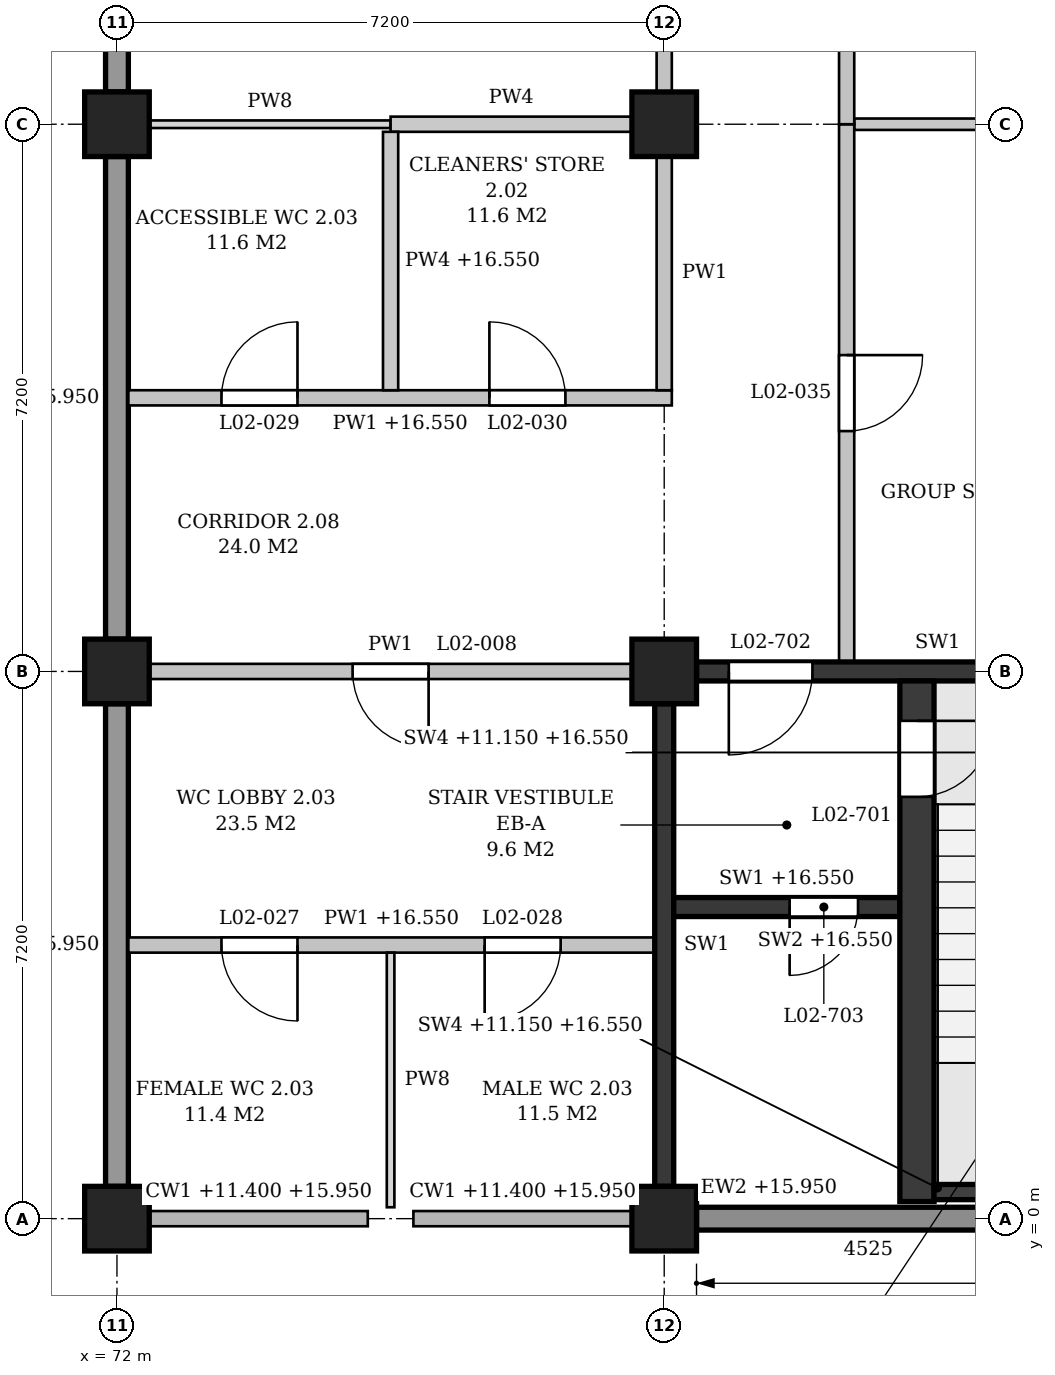
"""IFC4 building model, lengths in metres.
Left out: names, types, materials, properties, quantities, classifications, styles, units other than length and angle.
Written with IfcOpenShell. Run it as: python <this file> out.ifc"""

import sys

from ifc_helpers import new_model, si_unit, direction, frame, frame_2d, origin, origin_2d, place, context, subcontext, project, spatial, polyline, rectangle, outline, extrude, element, fill, save


model = new_model("IFC4")
c1 = context("Model", 3, precision=1e-05, world=origin(), true_north=direction((0.0, 1.0)))
c2 = subcontext(c1, "Body", "Model", "MODEL_VIEW")
j1 = project(units=[si_unit("LENGTHUNIT", "METRE"), si_unit("PLANEANGLEUNIT", "RADIAN")], contexts=[c1])
p1 = place(None, origin())
s1 = spatial("IfcSite", under=j1, at=p1, CompositionType="ELEMENT")
p2 = place(p1, origin())
s2 = spatial("IfcBuilding", under=s1, at=p2, CompositionType="ELEMENT")
p3 = place(p2, frame((0.0, 0.0, 11.4)))
s3 = spatial("IfcBuildingStorey", under=s2, at=p3, CompositionType="ELEMENT", Elevation=11.4)
for number, where, z_axis, x_axis in (
    (1, (72.0, 0.0, 0.0), (0.0, 0.0, 1.0), (1.0, 0.0, 0.0)),
    (2, (72.0, 7.2, 0.0), (0.0, 0.0, 1.0), (1.0, 0.0, 0.0)),
    (3, (72.0, 14.4, 0.0), (0.0, 0.0, 1.0), (1.0, 0.0, 0.0)),
    (4, (79.2, 0.0, 0.0), (0.0, 0.0, 1.0), (1.0, 0.0, 0.0)),
    (5, (79.2, 7.2, 0.0), (0.0, 0.0, 1.0), (1.0, 0.0, 0.0)),
    (6, (79.2, 14.4, 0.0), (0.0, 0.0, 1.0), (1.0, 0.0, 0.0)),
):
    element("IfcColumn", number, at=place(p3, frame(where, z_axis=z_axis, x_axis=x_axis)), inside=s3, PredefinedType="COLUMN", context=c2, shape_type="SweptSolid", body=[
        extrude(rectangle(XDim=0.85, YDim=0.85, at=origin_2d()), origin(), (0.0, 0.0, 1.0), 5.4),
    ])
p4 = place(p3, frame((79.625, 0.0, 0.0), z_axis=(0.0, 0.0, 1.0), x_axis=(1.0, 0.0, 0.0)))
e7 = element("IfcWall", 7, at=p4, inside=s3, PredefinedType="STANDARD", context=c2, shape_type="SweptSolid", body=[
    extrude(rectangle(XDim=6.35, YDim=0.3, at=frame_2d((3.175, 0.0))), origin(), (0.0, 0.0, 1.0), 4.55),
])
p5 = place(p4, frame((4.525, 0.0, 0.9)))
e8 = element("IfcOpeningElement", 8, at=p5, cuts=e7, PredefinedType="OPENING", context=c2, shape_type="SweptSolid", body=[
    extrude(outline(polyline([(0.0, 0.0), (0.9, 0.0), (0.9, 2.65), (0.45, 3.1), (0.0, 2.65), (0.0, 0.0)])), frame((0.0, 0.16, 0.0), z_axis=(0.0, -1.0, 0.0), x_axis=(1.0, 0.0, 0.0)), (0.0, 0.0, 1.0), 0.32),
])
p6 = place(p3, frame((72.0, 0.425, 0.0), z_axis=(0.0, 0.0, 1.0), x_axis=(0.0, 1.0, 0.0)))
e9 = element("IfcWall", 9, at=p6, inside=s3, PredefinedType="STANDARD", context=c2, shape_type="SweptSolid", body=[
    extrude(rectangle(XDim=6.35, YDim=0.3, at=frame_2d((3.175, 0.0))), origin(), (0.0, 0.0, 1.0), 4.55),
])
for number, where, z_axis, x_axis in (
    (10, (72.0, 7.625, 0.0), (0.0, 0.0, 1.0), (0.0, 1.0, 0.0)),
    (11, (72.0, 14.825, 0.0), (0.0, 0.0, 1.0), (0.0, 1.0, 0.0)),
):
    element("IfcWall", number, at=place(p3, frame(where, z_axis=z_axis, x_axis=x_axis)), inside=s3, PredefinedType="STANDARD", context=c2, shape_type="SweptSolid", body=[
        extrude(rectangle(XDim=6.35, YDim=0.3, at=frame_2d((3.175, 0.0))), origin(), (0.0, 0.0, 1.0), 4.55),
    ])
p7 = place(p3, frame((79.625, 7.2, 0.0), z_axis=(0.0, 0.0, 1.0), x_axis=(1.0, 0.0, 0.0)))
e12 = element("IfcWall", 12, at=p7, inside=s3, PredefinedType="SHEAR", context=c2, shape_type="SweptSolid", body=[
    extrude(rectangle(XDim=6.35, YDim=0.25, at=frame_2d((3.175, 0.0))), origin(), (0.0, 0.0, 1.0), 4.4),
])
p8 = place(p7, frame((0.425, 0.0, 0.0)))
e13 = element("IfcOpeningElement", 13, at=p8, cuts=e12, PredefinedType="OPENING", context=c2, shape_type="SweptSolid", body=[
    extrude(rectangle(XDim=1.1, YDim=2.1, at=frame_2d((0.55, 1.05))), frame((0.0, 0.135, 0.0), z_axis=(0.0, -1.0, 0.0), x_axis=(1.0, 0.0, 0.0)), (0.0, 0.0, 1.0), 0.27),
])
p9 = place(p3, frame((79.2, 0.425, 0.0), z_axis=(0.0, 0.0, 1.0), x_axis=(0.0, 1.0, 0.0)))
e14 = element("IfcWall", 14, at=p9, inside=s3, PredefinedType="SHEAR", context=c2, shape_type="SweptSolid", body=[
    extrude(rectangle(XDim=6.35, YDim=0.25, at=frame_2d((3.175, 0.0))), origin(), (0.0, 0.0, 1.0), 4.4),
])
p10 = place(p3, frame((82.75, 0.35, -0.25), z_axis=(0.0, 0.0, 1.0), x_axis=(1.0, 0.0, 0.0)))
e15 = element("IfcWall", 15, at=p10, inside=s3, PredefinedType="SHEAR", context=c2, shape_type="SweptSolid", body=[
    extrude(rectangle(XDim=1.4, YDim=0.2, at=frame_2d((0.7, 0.0))), origin(), (0.0, 0.0, 1.0), 5.4),
])
p11 = place(p3, frame((82.525, 0.225, 0.0), z_axis=(0.0, 0.0, 1.0), x_axis=(0.0, 1.0, 0.0)))
e16 = element("IfcWall", 16, at=p11, inside=s3, PredefinedType="SHEAR", context=c2, shape_type="SweptSolid", body=[
    extrude(rectangle(XDim=6.85, YDim=0.45, at=frame_2d((3.425, 0.0))), origin(), (0.0, 0.0, 1.0), 5.15),
])
p12 = place(p11, frame((5.325, 0.0, 0.0)))
e17 = element("IfcOpeningElement", 17, at=p12, cuts=e16, PredefinedType="OPENING", context=c2, shape_type="SweptSolid", body=[
    extrude(rectangle(XDim=1.0, YDim=2.1, at=frame_2d((0.5, 1.05))), frame((0.0, 0.235, 0.0), z_axis=(0.0, -1.0, 0.0), x_axis=(1.0, 0.0, 0.0)), (0.0, 0.0, 1.0), 0.47),
])
p13 = place(p3, frame((79.325, 4.1, 0.0), z_axis=(0.0, 0.0, 1.0), x_axis=(1.0, 0.0, 0.0)))
e18 = element("IfcWall", 18, at=p13, inside=s3, PredefinedType="SHEAR", context=c2, shape_type="SweptSolid", body=[
    extrude(rectangle(XDim=2.975, YDim=0.25, at=frame_2d((1.488, 0.0))), origin(), (0.0, 0.0, 1.0), 5.15),
])
p14 = place(p13, frame((1.525, 0.0, 0.0)))
e19 = element("IfcOpeningElement", 19, at=p14, cuts=e18, PredefinedType="OPENING", context=c2, shape_type="SweptSolid", body=[
    extrude(rectangle(XDim=0.9, YDim=2.1, at=frame_2d((0.45, 1.05))), frame((0.0, 0.135, 0.0), z_axis=(0.0, -1.0, 0.0), x_axis=(1.0, 0.0, 0.0)), (0.0, 0.0, 1.0), 0.27),
])
p15 = place(p3, frame((72.15, 3.6, 0.0), z_axis=(0.0, 0.0, 1.0), x_axis=(1.0, 0.0, 0.0)))
e20 = element("IfcWall", 20, at=p15, inside=s3, PredefinedType="PARTITIONING", context=c2, shape_type="SweptSolid", body=[
    extrude(outline(polyline([(0.0, 0.0), (6.925, 0.0), (6.925, 4.4), (6.8, 4.4), (6.8, 5.15), (0.1, 5.15), (0.1, 4.55), (0.0, 4.55), (0.0, 0.0)])), frame((0.0, 0.1, 0.0), z_axis=(0.0, -1.0, 0.0), x_axis=(1.0, 0.0, 0.0)), (0.0, 0.0, 1.0), 0.2),
])
p16 = place(p15, frame((1.225, 0.0, 0.0)))
e21 = element("IfcOpeningElement", 21, at=p16, cuts=e20, PredefinedType="OPENING", context=c2, shape_type="SweptSolid", body=[
    extrude(rectangle(XDim=1.0, YDim=2.1, at=frame_2d((0.5, 1.05))), frame((0.0, 0.11, 0.0), z_axis=(0.0, -1.0, 0.0), x_axis=(1.0, 0.0, 0.0)), (0.0, 0.0, 1.0), 0.22),
])
p17 = place(p15, frame((4.688, 0.0, 0.0)))
e22 = element("IfcOpeningElement", 22, at=p17, cuts=e20, PredefinedType="OPENING", context=c2, shape_type="SweptSolid", body=[
    extrude(rectangle(XDim=1.0, YDim=2.1, at=frame_2d((0.5, 1.05))), frame((0.0, 0.11, 0.0), z_axis=(0.0, -1.0, 0.0), x_axis=(1.0, 0.0, 0.0)), (0.0, 0.0, 1.0), 0.22),
])
p18 = place(p3, frame((72.425, 7.2, 0.0), z_axis=(0.0, 0.0, 1.0), x_axis=(1.0, 0.0, 0.0)))
e23 = element("IfcWall", 23, at=p18, inside=s3, PredefinedType="PARTITIONING", context=c2, shape_type="SweptSolid", body=[
    extrude(rectangle(XDim=6.35, YDim=0.2, at=frame_2d((3.175, 0.0))), origin(), (0.0, 0.0, 1.0), 4.4),
])
p19 = place(p18, frame((2.675, 0.0, 0.0)))
e24 = element("IfcOpeningElement", 24, at=p19, cuts=e23, PredefinedType="OPENING", context=c2, shape_type="SweptSolid", body=[
    extrude(rectangle(XDim=1.0, YDim=2.1, at=frame_2d((0.5, 1.05))), frame((0.0, 0.11, 0.0), z_axis=(0.0, -1.0, 0.0), x_axis=(1.0, 0.0, 0.0)), (0.0, 0.0, 1.0), 0.22),
])
p20 = place(p3, frame((72.15, 10.8, 0.0), z_axis=(0.0, 0.0, 1.0), x_axis=(1.0, 0.0, 0.0)))
e25 = element("IfcWall", 25, at=p20, inside=s3, PredefinedType="PARTITIONING", context=c2, shape_type="SweptSolid", body=[
    extrude(outline(polyline([(0.0, 0.0), (7.15, 0.0), (7.15, 4.4), (6.8, 4.4), (6.8, 5.15), (0.1, 5.15), (0.1, 4.55), (0.0, 4.55), (0.0, 0.0)])), frame((0.0, 0.1, 0.0), z_axis=(0.0, -1.0, 0.0), x_axis=(1.0, 0.0, 0.0)), (0.0, 0.0, 1.0), 0.2),
])
p21 = place(p20, frame((1.225, 0.0, 0.0)))
e26 = element("IfcOpeningElement", 26, at=p21, cuts=e25, PredefinedType="OPENING", context=c2, shape_type="SweptSolid", body=[
    extrude(rectangle(XDim=1.0, YDim=2.1, at=frame_2d((0.5, 1.05))), frame((0.0, 0.11, 0.0), z_axis=(0.0, -1.0, 0.0), x_axis=(1.0, 0.0, 0.0)), (0.0, 0.0, 1.0), 0.22),
])
p22 = place(p20, frame((4.75, 0.0, 0.0)))
e27 = element("IfcOpeningElement", 27, at=p22, cuts=e25, PredefinedType="OPENING", context=c2, shape_type="SweptSolid", body=[
    extrude(rectangle(XDim=1.0, YDim=2.1, at=frame_2d((0.5, 1.05))), frame((0.0, 0.11, 0.0), z_axis=(0.0, -1.0, 0.0), x_axis=(1.0, 0.0, 0.0)), (0.0, 0.0, 1.0), 0.22),
])
p23 = place(p3, frame((72.425, 14.4, 0.0), z_axis=(0.0, 0.0, 1.0), x_axis=(1.0, 0.0, 0.0)))
e28 = element("IfcWall", 28, at=p23, inside=s3, PredefinedType="PARTITIONING", context=c2, shape_type="SweptSolid", body=[
    extrude(rectangle(XDim=3.175, YDim=0.1, at=frame_2d((1.587, 0.0))), origin(), (0.0, 0.0, 1.0), 4.4),
])
p24 = place(p3, frame((75.6, 14.4, 0.0), z_axis=(0.0, 0.0, 1.0), x_axis=(1.0, 0.0, 0.0)))
e29 = element("IfcWall", 29, at=p24, inside=s3, PredefinedType="PARTITIONING", context=c2, shape_type="SweptSolid", body=[
    extrude(rectangle(XDim=3.175, YDim=0.2, at=frame_2d((1.587, 0.0))), origin(), (0.0, 0.0, 1.0), 4.4),
])
p25 = place(p3, frame((81.7, 14.4, 0.0), z_axis=(0.0, 0.0, 1.0), x_axis=(1.0, 0.0, 0.0)))
e30 = element("IfcWall", 30, at=p25, inside=s3, PredefinedType="PARTITIONING", context=c2, shape_type="SweptSolid", body=[
    extrude(rectangle(XDim=4.275, YDim=0.15, at=frame_2d((2.138, 0.0))), origin(), (0.0, 0.0, 1.0), 4.4),
])
p26 = place(p3, frame((75.6, 0.15, 0.0), z_axis=(0.0, 0.0, 1.0), x_axis=(0.0, 1.0, 0.0)))
e31 = element("IfcWall", 31, at=p26, inside=s3, PredefinedType="PARTITIONING", context=c2, shape_type="SweptSolid", body=[
    extrude(rectangle(XDim=3.35, YDim=0.1, at=frame_2d((1.675, 0.0))), origin(), (0.0, 0.0, 1.0), 4.4),
])
p27 = place(p3, frame((75.6, 10.9, 0.0), z_axis=(0.0, 0.0, 1.0), x_axis=(0.0, 1.0, 0.0)))
e32 = element("IfcWall", 32, at=p27, inside=s3, PredefinedType="PARTITIONING", context=c2, shape_type="SweptSolid", body=[
    extrude(outline(polyline([(0.0, 0.0), (3.4, 0.0), (3.4, 4.4), (3.25, 4.4), (3.25, 5.15), (0.0, 5.15), (0.0, 0.0)])), frame((0.0, 0.1, 0.0), z_axis=(0.0, -1.0, 0.0), x_axis=(1.0, 0.0, 0.0)), (0.0, 0.0, 1.0), 0.2),
])
p28 = place(p3, frame((79.2, 10.9, 0.0), z_axis=(0.0, 0.0, 1.0), x_axis=(0.0, 1.0, 0.0)))
e33 = element("IfcWall", 33, at=p28, inside=s3, PredefinedType="PARTITIONING", context=c2, shape_type="SweptSolid", body=[
    extrude(rectangle(XDim=3.075, YDim=0.2, at=frame_2d((1.538, 0.0))), origin(), (0.0, 0.0, 1.0), 4.4),
])
p29 = place(p3, frame((79.2, 14.825, 0.0), z_axis=(0.0, 0.0, 1.0), x_axis=(0.0, 1.0, 0.0)))
e34 = element("IfcWall", 34, at=p29, inside=s3, PredefinedType="PARTITIONING", context=c2, shape_type="SweptSolid", body=[
    extrude(rectangle(XDim=6.35, YDim=0.2, at=frame_2d((3.175, 0.0))), origin(), (0.0, 0.0, 1.0), 4.4),
])
p30 = place(p29, frame((2.675, 0.0, 0.0)))
e35 = element("IfcOpeningElement", 35, at=p30, cuts=e34, PredefinedType="OPENING", context=c2, shape_type="SweptSolid", body=[
    extrude(rectangle(XDim=1.0, YDim=2.1, at=frame_2d((0.5, 1.05))), frame((0.0, 0.11, 0.0), z_axis=(0.0, -1.0, 0.0), x_axis=(1.0, 0.0, 0.0)), (0.0, 0.0, 1.0), 0.22),
])
p31 = place(p3, frame((81.6, 7.325, 0.0), z_axis=(0.0, 0.0, 1.0), x_axis=(0.0, 1.0, 0.0)))
e36 = element("IfcWall", 36, at=p31, inside=s3, PredefinedType="PARTITIONING", context=c2, shape_type="SweptSolid", body=[
    extrude(outline(polyline([(0.0, 0.0), (7.075, 0.0), (7.075, 4.4), (6.825, 4.4), (6.825, 5.15), (0.125, 5.15), (0.125, 4.4), (0.0, 4.4), (0.0, 0.0)])), frame((0.0, 0.1, 0.0), z_axis=(0.0, -1.0, 0.0), x_axis=(1.0, 0.0, 0.0)), (0.0, 0.0, 1.0), 0.2),
])
p32 = place(p31, frame((3.037, 0.0, 0.0)))
e37 = element("IfcOpeningElement", 37, at=p32, cuts=e36, PredefinedType="OPENING", context=c2, shape_type="SweptSolid", body=[
    extrude(rectangle(XDim=1.0, YDim=2.1, at=frame_2d((0.5, 1.05))), frame((0.0, 0.11, 0.0), z_axis=(0.0, -1.0, 0.0), x_axis=(1.0, 0.0, 0.0)), (0.0, 0.0, 1.0), 0.22),
])
p33 = place(p3, frame((81.6, 14.4, 0.0), z_axis=(0.0, 0.0, 1.0), x_axis=(0.0, 1.0, 0.0)))
e38 = element("IfcWall", 38, at=p33, inside=s3, PredefinedType="PARTITIONING", context=c2, shape_type="SweptSolid", body=[
    extrude(outline(polyline([(0.0, 0.0), (7.2, 0.0), (7.2, 4.4), (6.95, 4.4), (6.95, 5.15), (0.25, 5.15), (0.25, 4.4), (0.0, 4.4), (0.0, 0.0)])), frame((0.0, 0.1, 0.0), z_axis=(0.0, -1.0, 0.0), x_axis=(1.0, 0.0, 0.0)), (0.0, 0.0, 1.0), 0.2),
])
p34 = place(p33, frame((1.3, 0.0, 0.0)))
e39 = element("IfcOpeningElement", 39, at=p34, cuts=e38, PredefinedType="OPENING", context=c2, shape_type="SweptSolid", body=[
    extrude(rectangle(XDim=1.0, YDim=2.1, at=frame_2d((0.5, 1.05))), frame((0.0, 0.11, 0.0), z_axis=(0.0, -1.0, 0.0), x_axis=(1.0, 0.0, 0.0)), (0.0, 0.0, 1.0), 0.22),
])
p35 = place(p33, frame((4.9, 0.0, 0.0)))
e40 = element("IfcOpeningElement", 40, at=p35, cuts=e38, PredefinedType="OPENING", context=c2, shape_type="SweptSolid", body=[
    extrude(rectangle(XDim=1.0, YDim=2.1, at=frame_2d((0.5, 1.05))), frame((0.0, 0.11, 0.0), z_axis=(0.0, -1.0, 0.0), x_axis=(1.0, 0.0, 0.0)), (0.0, 0.0, 1.0), 0.22),
])
p36 = place(p12, frame((1.0, 0.0, 0.0), z_axis=(0.0, 0.0, 1.0), x_axis=(-1.0, 0.0, 0.0)))
e41 = element("IfcDoor", 41, at=p36, inside=s3, OperationType="SINGLE_SWING_LEFT", PredefinedType="DOOR", context=c2, shape_type="SweptSolid", body=[
    extrude(rectangle(XDim=1.0, YDim=2.1, at=frame_2d((0.5, 1.05))), frame((0.0, 0.025, 0.0), z_axis=(0.0, -1.0, 0.0), x_axis=(1.0, 0.0, 0.0)), (0.0, 0.0, 1.0), 0.05),
])
fill(e17, e41)
p37 = place(p8, frame((1.1, 0.0, 0.0), z_axis=(0.0, 0.0, 1.0), x_axis=(-1.0, 0.0, 0.0)))
e42 = element("IfcDoor", 42, at=p37, inside=s3, OperationType="SINGLE_SWING_RIGHT", PredefinedType="DOOR", context=c2, shape_type="SweptSolid", body=[
    extrude(rectangle(XDim=1.1, YDim=2.1, at=frame_2d((0.55, 1.05))), frame((0.0, 0.025, 0.0), z_axis=(0.0, -1.0, 0.0), x_axis=(1.0, 0.0, 0.0)), (0.0, 0.0, 1.0), 0.05),
])
fill(e13, e42)
p38 = place(p14, frame((0.9, 0.0, 0.0), z_axis=(0.0, 0.0, 1.0), x_axis=(-1.0, 0.0, 0.0)))
e43 = element("IfcDoor", 43, at=p38, inside=s3, OperationType="SINGLE_SWING_RIGHT", PredefinedType="DOOR", context=c2, shape_type="SweptSolid", body=[
    extrude(rectangle(XDim=0.9, YDim=2.1, at=frame_2d((0.45, 1.05))), frame((0.0, 0.025, 0.0), z_axis=(0.0, -1.0, 0.0), x_axis=(1.0, 0.0, 0.0)), (0.0, 0.0, 1.0), 0.05),
])
fill(e19, e43)
p39 = place(p19, frame((1.0, 0.0, 0.0), z_axis=(0.0, 0.0, 1.0), x_axis=(-1.0, 0.0, 0.0)))
e44 = element("IfcDoor", 44, at=p39, inside=s3, OperationType="SINGLE_SWING_LEFT", PredefinedType="DOOR", context=c2, shape_type="SweptSolid", body=[
    extrude(rectangle(XDim=1.0, YDim=2.1, at=frame_2d((0.5, 1.05))), frame((0.0, 0.025, 0.0), z_axis=(0.0, -1.0, 0.0), x_axis=(1.0, 0.0, 0.0)), (0.0, 0.0, 1.0), 0.05),
])
fill(e24, e44)
p40 = place(p16, frame((1.0, 0.0, 0.0), z_axis=(0.0, 0.0, 1.0), x_axis=(-1.0, 0.0, 0.0)))
e45 = element("IfcDoor", 45, at=p40, inside=s3, OperationType="SINGLE_SWING_LEFT", PredefinedType="DOOR", context=c2, shape_type="SweptSolid", body=[
    extrude(rectangle(XDim=1.0, YDim=2.1, at=frame_2d((0.5, 1.05))), frame((0.0, 0.025, 0.0), z_axis=(0.0, -1.0, 0.0), x_axis=(1.0, 0.0, 0.0)), (0.0, 0.0, 1.0), 0.05),
])
fill(e21, e45)
p41 = place(p17, frame((1.0, 0.0, 0.0), z_axis=(0.0, 0.0, 1.0), x_axis=(-1.0, 0.0, 0.0)))
e46 = element("IfcDoor", 46, at=p41, inside=s3, OperationType="SINGLE_SWING_RIGHT", PredefinedType="DOOR", context=c2, shape_type="SweptSolid", body=[
    extrude(rectangle(XDim=1.0, YDim=2.1, at=frame_2d((0.5, 1.05))), frame((0.0, 0.025, 0.0), z_axis=(0.0, -1.0, 0.0), x_axis=(1.0, 0.0, 0.0)), (0.0, 0.0, 1.0), 0.05),
])
fill(e22, e46)
p42 = place(p21, origin())
e47 = element("IfcDoor", 47, at=p42, inside=s3, OperationType="SINGLE_SWING_RIGHT", PredefinedType="DOOR", context=c2, shape_type="SweptSolid", body=[
    extrude(rectangle(XDim=1.0, YDim=2.1, at=frame_2d((0.5, 1.05))), frame((0.0, 0.025, 0.0), z_axis=(0.0, -1.0, 0.0), x_axis=(1.0, 0.0, 0.0)), (0.0, 0.0, 1.0), 0.05),
])
fill(e26, e47)
p43 = place(p22, origin())
e48 = element("IfcDoor", 48, at=p43, inside=s3, OperationType="SINGLE_SWING_LEFT", PredefinedType="DOOR", context=c2, shape_type="SweptSolid", body=[
    extrude(rectangle(XDim=1.0, YDim=2.1, at=frame_2d((0.5, 1.05))), frame((0.0, 0.025, 0.0), z_axis=(0.0, -1.0, 0.0), x_axis=(1.0, 0.0, 0.0)), (0.0, 0.0, 1.0), 0.05),
])
fill(e27, e48)
p44 = place(p32, frame((1.0, 0.0, 0.0), z_axis=(0.0, 0.0, 1.0), x_axis=(-1.0, 0.0, 0.0)))
e49 = element("IfcDoor", 49, at=p44, inside=s3, OperationType="SINGLE_SWING_LEFT", PredefinedType="DOOR", context=c2, shape_type="SweptSolid", body=[
    extrude(rectangle(XDim=1.0, YDim=2.1, at=frame_2d((0.5, 1.05))), frame((0.0, 0.025, 0.0), z_axis=(0.0, -1.0, 0.0), x_axis=(1.0, 0.0, 0.0)), (0.0, 0.0, 1.0), 0.05),
])
fill(e37, e49)
save(model, sys.argv[1])
